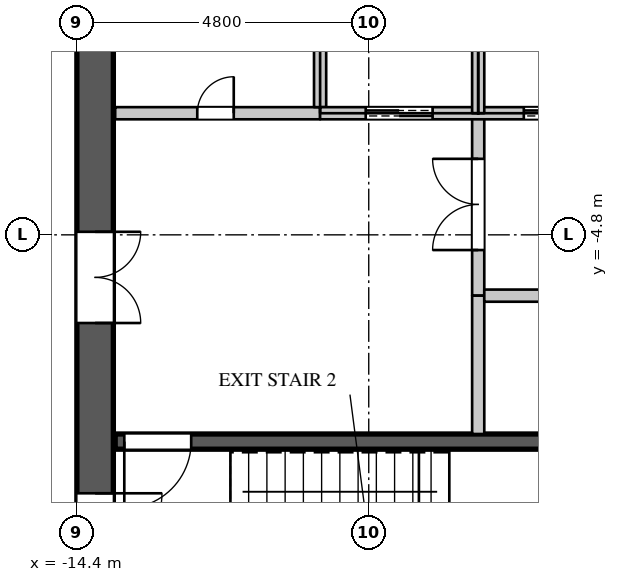
"""IFC4 building model, lengths in metres.
Left out: names, types, materials, properties, quantities, classifications, styles, units other than length and angle.
Written with IfcOpenShell. Run it as: python <this file> out.ifc"""

import sys

from ifc_helpers import new_model, si_unit, direction, frame, frame_2d, origin, place, context, subcontext, project, spatial, rectangle, extrude, element, fill, save


model = new_model("IFC4")
c1 = context("Model", 3, precision=1e-05, world=origin(), true_north=direction((0.0, 1.0)))
c2 = subcontext(c1, "Body", "Model", "MODEL_VIEW")
j1 = project(units=[si_unit("LENGTHUNIT", "METRE"), si_unit("PLANEANGLEUNIT", "RADIAN")], contexts=[c1])
p1 = place(None, origin())
s1 = spatial("IfcSite", under=j1, at=p1, CompositionType="ELEMENT")
p2 = place(p1, origin())
s2 = spatial("IfcBuilding", under=s1, at=p2, CompositionType="ELEMENT")
p3 = place(p2, frame((0.0, 0.0, 310.5)))
s3 = spatial("IfcBuildingStorey", under=s2, at=p3, CompositionType="ELEMENT", Elevation=310.5)
p4 = place(p3, frame((-14.1, -11.4, 0.0), z_axis=(0.0, 0.0, 1.0), x_axis=(0.0, 1.0, 0.0)))
e1 = element("IfcWall", 1, at=p4, inside=s3, PredefinedType="SHEAR", context=c2, shape_type="SweptSolid", body=[
    extrude(rectangle(XDim=22.8, YDim=0.6, at=frame_2d((11.4, 0.0))), origin(), (0.0, 0.0, 1.0), 4.2),
])
p5 = place(p4, frame((20.45, 0.0, 0.0)))
e2 = element("IfcOpeningElement", 2, at=p5, cuts=e1, PredefinedType="OPENING", context=c2, shape_type="SweptSolid", body=[
    extrude(rectangle(XDim=1.1, YDim=2.2, at=frame_2d((0.55, 1.1))), frame((0.0, 0.31, 0.0), z_axis=(0.0, -1.0, 0.0), x_axis=(1.0, 0.0, 0.0)), (0.0, 0.0, 1.0), 0.62),
])
p6 = place(p4, frame((1.25, 0.0, 0.0)))
e3 = element("IfcOpeningElement", 3, at=p6, cuts=e1, PredefinedType="OPENING", context=c2, shape_type="SweptSolid", body=[
    extrude(rectangle(XDim=1.1, YDim=2.2, at=frame_2d((0.55, 1.1))), frame((0.0, 0.31, 0.0), z_axis=(0.0, -1.0, 0.0), x_axis=(1.0, 0.0, 0.0)), (0.0, 0.0, 1.0), 0.62),
])
p7 = place(p4, frame((16.15, 0.0, 0.0)))
e4 = element("IfcOpeningElement", 4, at=p7, cuts=e1, PredefinedType="OPENING", context=c2, shape_type="SweptSolid", body=[
    extrude(rectangle(XDim=1.5, YDim=2.4, at=frame_2d((0.75, 1.2))), frame((0.0, 0.31, 0.0), z_axis=(0.0, -1.0, 0.0), x_axis=(1.0, 0.0, 0.0)), (0.0, 0.0, 1.0), 0.62),
])
p8 = place(p4, frame((5.15, 0.0, 0.0)))
e5 = element("IfcOpeningElement", 5, at=p8, cuts=e1, PredefinedType="OPENING", context=c2, shape_type="SweptSolid", body=[
    extrude(rectangle(XDim=1.5, YDim=2.4, at=frame_2d((0.75, 1.2))), frame((0.0, 0.31, 0.0), z_axis=(0.0, -1.0, 0.0), x_axis=(1.0, 0.0, 0.0)), (0.0, 0.0, 1.0), 0.62),
])
p9 = place(p3, frame((-7.8, -5.8, 0.0), z_axis=(0.0, 0.0, 1.0), x_axis=(0.0, 1.0, 0.0)))
e6 = element("IfcWall", 6, at=p9, inside=s3, PredefinedType="PARTITIONING", context=c2, shape_type="SweptSolid", body=[
    extrude(rectangle(XDim=3.0, YDim=0.2, at=frame_2d((1.5, 0.0))), origin(), (0.0, 0.0, 1.0), 3.9),
])
p10 = place(p9, frame((0.75, 0.0, 0.0)))
e7 = element("IfcOpeningElement", 7, at=p10, cuts=e6, PredefinedType="OPENING", context=c2, shape_type="SweptSolid", body=[
    extrude(rectangle(XDim=1.5, YDim=2.4, at=frame_2d((0.75, 1.2))), frame((0.0, 0.11, 0.0), z_axis=(0.0, -1.0, 0.0), x_axis=(1.0, 0.0, 0.0)), (0.0, 0.0, 1.0), 0.22),
])
p11 = place(p3, frame((-13.77, -2.8, 0.0), z_axis=(0.0, 0.0, 1.0), x_axis=(1.0, 0.0, 0.0)))
e8 = element("IfcWall", 8, at=p11, inside=s3, PredefinedType="PARTITIONING", context=c2, shape_type="SweptSolid", body=[
    extrude(rectangle(XDim=3.37, YDim=0.2, at=frame_2d((1.685, 0.0))), origin(), (0.0, 0.0, 1.0), 3.9),
])
p12 = place(p11, frame((1.35, 0.0, 0.0)))
e9 = element("IfcOpeningElement", 9, at=p12, cuts=e8, PredefinedType="OPENING", context=c2, shape_type="SweptSolid", body=[
    extrude(rectangle(XDim=0.6, YDim=2.0, at=frame_2d((0.3, 1.0))), frame((0.0, 0.11, 0.0), z_axis=(0.0, -1.0, 0.0), x_axis=(1.0, 0.0, 0.0)), (0.0, 0.0, 1.0), 0.22),
])
p13 = place(p3, frame((-7.8, -8.075, 0.0), z_axis=(0.0, 0.0, 1.0), x_axis=(0.0, 1.0, 0.0)))
e10 = element("IfcWall", 10, at=p13, inside=s3, PredefinedType="PARTITIONING", context=c2, shape_type="SweptSolid", body=[
    extrude(rectangle(XDim=2.275, YDim=0.2, at=frame_2d((1.137, 0.0))), origin(), (0.0, 0.0, 1.0), 3.9),
])
p14 = place(p3, frame((-7.7, -5.8, 0.0), z_axis=(0.0, 0.0, 1.0), x_axis=(1.0, 0.0, 0.0)))
e11 = element("IfcWall", 11, at=p14, inside=s3, PredefinedType="PARTITIONING", context=c2, shape_type="SweptSolid", body=[
    extrude(rectangle(XDim=3.88, YDim=0.2, at=frame_2d((1.94, 0.0))), origin(), (0.0, 0.0, 1.0), 3.9),
])
p15 = place(p14, frame((1.5, 0.0, 0.0)))
e12 = element("IfcOpeningElement", 12, at=p15, cuts=e11, PredefinedType="OPENING", context=c2, shape_type="SweptSolid", body=[
    extrude(rectangle(XDim=0.9, YDim=2.2, at=frame_2d((0.45, 1.1))), frame((0.0, 0.11, 0.0), z_axis=(0.0, -1.0, 0.0), x_axis=(1.0, 0.0, 0.0)), (0.0, 0.0, 1.0), 0.22),
])
p16 = place(p3, frame((-10.4, -2.7, 0.0), z_axis=(0.0, 0.0, 1.0), x_axis=(0.0, 1.0, 0.0)))
e13 = element("IfcWall", 13, at=p16, inside=s3, PredefinedType="PARTITIONING", context=c2, shape_type="SweptSolid", body=[
    extrude(rectangle(XDim=2.7, YDim=0.2, at=frame_2d((1.35, 0.0))), origin(), (0.0, 0.0, 1.0), 3.9),
])
p17 = place(p3, frame((-10.4, -2.8, 0.0), z_axis=(0.0, 0.0, 1.0), x_axis=(1.0, 0.0, 0.0)))
e14 = element("IfcWall", 14, at=p17, inside=s3, PredefinedType="PARTITIONING", context=c2, shape_type="SweptSolid", body=[
    extrude(rectangle(XDim=18.2, YDim=0.2, at=frame_2d((9.1, 0.0))), origin(), (0.0, 0.0, 1.0), 3.9),
])
p18 = place(p17, frame((0.75, 0.0, 0.0)))
e15 = element("IfcOpeningElement", 15, at=p18, cuts=e14, PredefinedType="OPENING", context=c2, shape_type="SweptSolid", body=[
    extrude(rectangle(XDim=1.1, YDim=2.2, at=frame_2d((0.55, 1.1))), frame((0.0, 0.11, 0.0), z_axis=(0.0, -1.0, 0.0), x_axis=(1.0, 0.0, 0.0)), (0.0, 0.0, 1.0), 0.22),
])
p19 = place(p17, frame((3.35, 0.0, 0.0)))
e16 = element("IfcOpeningElement", 16, at=p19, cuts=e14, PredefinedType="OPENING", context=c2, shape_type="SweptSolid", body=[
    extrude(rectangle(XDim=1.1, YDim=2.2, at=frame_2d((0.55, 1.1))), frame((0.0, 0.11, 0.0), z_axis=(0.0, -1.0, 0.0), x_axis=(1.0, 0.0, 0.0)), (0.0, 0.0, 1.0), 0.22),
])
p20 = place(p17, frame((5.95, 0.0, 0.0)))
e17 = element("IfcOpeningElement", 17, at=p20, cuts=e14, PredefinedType="OPENING", context=c2, shape_type="SweptSolid", body=[
    extrude(rectangle(XDim=1.1, YDim=2.2, at=frame_2d((0.55, 1.1))), frame((0.0, 0.11, 0.0), z_axis=(0.0, -1.0, 0.0), x_axis=(1.0, 0.0, 0.0)), (0.0, 0.0, 1.0), 0.22),
])
p21 = place(p17, frame((8.55, 0.0, 0.0)))
e18 = element("IfcOpeningElement", 18, at=p21, cuts=e14, PredefinedType="OPENING", context=c2, shape_type="SweptSolid", body=[
    extrude(rectangle(XDim=1.1, YDim=2.2, at=frame_2d((0.55, 1.1))), frame((0.0, 0.11, 0.0), z_axis=(0.0, -1.0, 0.0), x_axis=(1.0, 0.0, 0.0)), (0.0, 0.0, 1.0), 0.22),
])
p22 = place(p17, frame((11.15, 0.0, 0.0)))
e19 = element("IfcOpeningElement", 19, at=p22, cuts=e14, PredefinedType="OPENING", context=c2, shape_type="SweptSolid", body=[
    extrude(rectangle(XDim=1.1, YDim=2.2, at=frame_2d((0.55, 1.1))), frame((0.0, 0.11, 0.0), z_axis=(0.0, -1.0, 0.0), x_axis=(1.0, 0.0, 0.0)), (0.0, 0.0, 1.0), 0.22),
])
p23 = place(p17, frame((13.75, 0.0, 0.0)))
e20 = element("IfcOpeningElement", 20, at=p23, cuts=e14, PredefinedType="OPENING", context=c2, shape_type="SweptSolid", body=[
    extrude(rectangle(XDim=1.1, YDim=2.2, at=frame_2d((0.55, 1.1))), frame((0.0, 0.11, 0.0), z_axis=(0.0, -1.0, 0.0), x_axis=(1.0, 0.0, 0.0)), (0.0, 0.0, 1.0), 0.22),
])
p24 = place(p17, frame((16.35, 0.0, 0.0)))
e21 = element("IfcOpeningElement", 21, at=p24, cuts=e14, PredefinedType="OPENING", context=c2, shape_type="SweptSolid", body=[
    extrude(rectangle(XDim=1.1, YDim=2.2, at=frame_2d((0.55, 1.1))), frame((0.0, 0.11, 0.0), z_axis=(0.0, -1.0, 0.0), x_axis=(1.0, 0.0, 0.0)), (0.0, 0.0, 1.0), 0.22),
])
p25 = place(p3, frame((-7.8, -2.8, 0.0), z_axis=(0.0, 0.0, 1.0), x_axis=(0.0, 1.0, 0.0)))
e22 = element("IfcWall", 22, at=p25, inside=s3, PredefinedType="PARTITIONING", context=c2, shape_type="SweptSolid", body=[
    extrude(rectangle(XDim=2.8, YDim=0.2, at=frame_2d((1.4, 0.0))), origin(), (0.0, 0.0, 1.0), 3.9),
])
p26 = place(p3, frame((-13.77, -8.2, 0.0), z_axis=(0.0, 0.0, 1.0), x_axis=(1.0, 0.0, 0.0)))
e23 = element("IfcWall", 23, at=p26, inside=s3, PredefinedType="SHEAR", context=c2, shape_type="SweptSolid", body=[
    extrude(rectangle(XDim=8.495, YDim=0.25, at=frame_2d((4.248, 0.0))), origin(), (0.0, 0.0, 1.0), 3.9),
])
p27 = place(p26, frame((0.15, 0.0, 0.0)))
e24 = element("IfcOpeningElement", 24, at=p27, cuts=e23, PredefinedType="OPENING", context=c2, shape_type="SweptSolid", body=[
    extrude(rectangle(XDim=1.1, YDim=2.2, at=frame_2d((0.55, 1.1))), frame((0.0, 0.135, 0.0), z_axis=(0.0, -1.0, 0.0), x_axis=(1.0, 0.0, 0.0)), (0.0, 0.0, 1.0), 0.27),
])
p28 = place(p12, origin())
e25 = element("IfcDoor", 25, at=p28, inside=s3, OperationType="SINGLE_SWING_RIGHT", PredefinedType="DOOR", context=c2, shape_type="SweptSolid", body=[
    extrude(rectangle(XDim=0.6, YDim=2.0, at=frame_2d((0.3, 1.0))), frame((0.0, 0.025, 0.0), z_axis=(0.0, -1.0, 0.0), x_axis=(1.0, 0.0, 0.0)), (0.0, 0.0, 1.0), 0.05),
])
fill(e9, e25)
p29 = place(p18, origin())
e26 = element("IfcDoor", 26, at=p29, inside=s3, OperationType="DOUBLE_DOOR_SLIDING", PredefinedType="DOOR", context=c2, shape_type="SweptSolid", body=[
    extrude(rectangle(XDim=1.1, YDim=2.2, at=frame_2d((0.55, 1.1))), frame((0.0, 0.025, 0.0), z_axis=(0.0, -1.0, 0.0), x_axis=(1.0, 0.0, 0.0)), (0.0, 0.0, 1.0), 0.05),
])
fill(e15, e26)
p30 = place(p19, origin())
e27 = element("IfcDoor", 27, at=p30, inside=s3, OperationType="DOUBLE_DOOR_SLIDING", PredefinedType="DOOR", context=c2, shape_type="SweptSolid", body=[
    extrude(rectangle(XDim=1.1, YDim=2.2, at=frame_2d((0.55, 1.1))), frame((0.0, 0.025, 0.0), z_axis=(0.0, -1.0, 0.0), x_axis=(1.0, 0.0, 0.0)), (0.0, 0.0, 1.0), 0.05),
])
fill(e16, e27)
p31 = place(p27, origin())
e28 = element("IfcDoor", 28, at=p31, inside=s3, OperationType="SINGLE_SWING_RIGHT", PredefinedType="DOOR", context=c2, shape_type="SweptSolid", body=[
    extrude(rectangle(XDim=1.1, YDim=2.2, at=frame_2d((0.55, 1.1))), frame((0.0, 0.025, 0.0), z_axis=(0.0, -1.0, 0.0), x_axis=(1.0, 0.0, 0.0)), (0.0, 0.0, 1.0), 0.05),
])
fill(e24, e28)
p32 = place(p10, origin())
e29 = element("IfcDoor", 29, at=p32, inside=s3, OperationType="DOUBLE_DOOR_SINGLE_SWING", PredefinedType="DOOR", context=c2, shape_type="SweptSolid", body=[
    extrude(rectangle(XDim=1.5, YDim=2.4, at=frame_2d((0.75, 1.2))), frame((0.0, 0.025, 0.0), z_axis=(0.0, -1.0, 0.0), x_axis=(1.0, 0.0, 0.0)), (0.0, 0.0, 1.0), 0.05),
])
fill(e7, e29)
p33 = place(p6, origin())
e30 = element("IfcDoor", 30, at=p33, inside=s3, OperationType="SINGLE_SWING_LEFT", PredefinedType="DOOR", context=c2, shape_type="SweptSolid", body=[
    extrude(rectangle(XDim=1.1, YDim=2.2, at=frame_2d((0.55, 1.1))), frame((0.0, -0.245, 0.0), z_axis=(0.0, -1.0, 0.0), x_axis=(1.0, 0.0, 0.0)), (0.0, 0.0, 1.0), 0.05),
])
fill(e3, e30)
p34 = place(p8, origin())
e31 = element("IfcDoor", 31, at=p34, inside=s3, OperationType="DOUBLE_DOOR_SINGLE_SWING", PredefinedType="DOOR", context=c2, shape_type="SweptSolid", body=[
    extrude(rectangle(XDim=1.5, YDim=2.4, at=frame_2d((0.75, 1.2))), frame((0.0, -0.245, 0.0), z_axis=(0.0, -1.0, 0.0), x_axis=(1.0, 0.0, 0.0)), (0.0, 0.0, 1.0), 0.05),
])
fill(e5, e31)
save(model, sys.argv[1])
